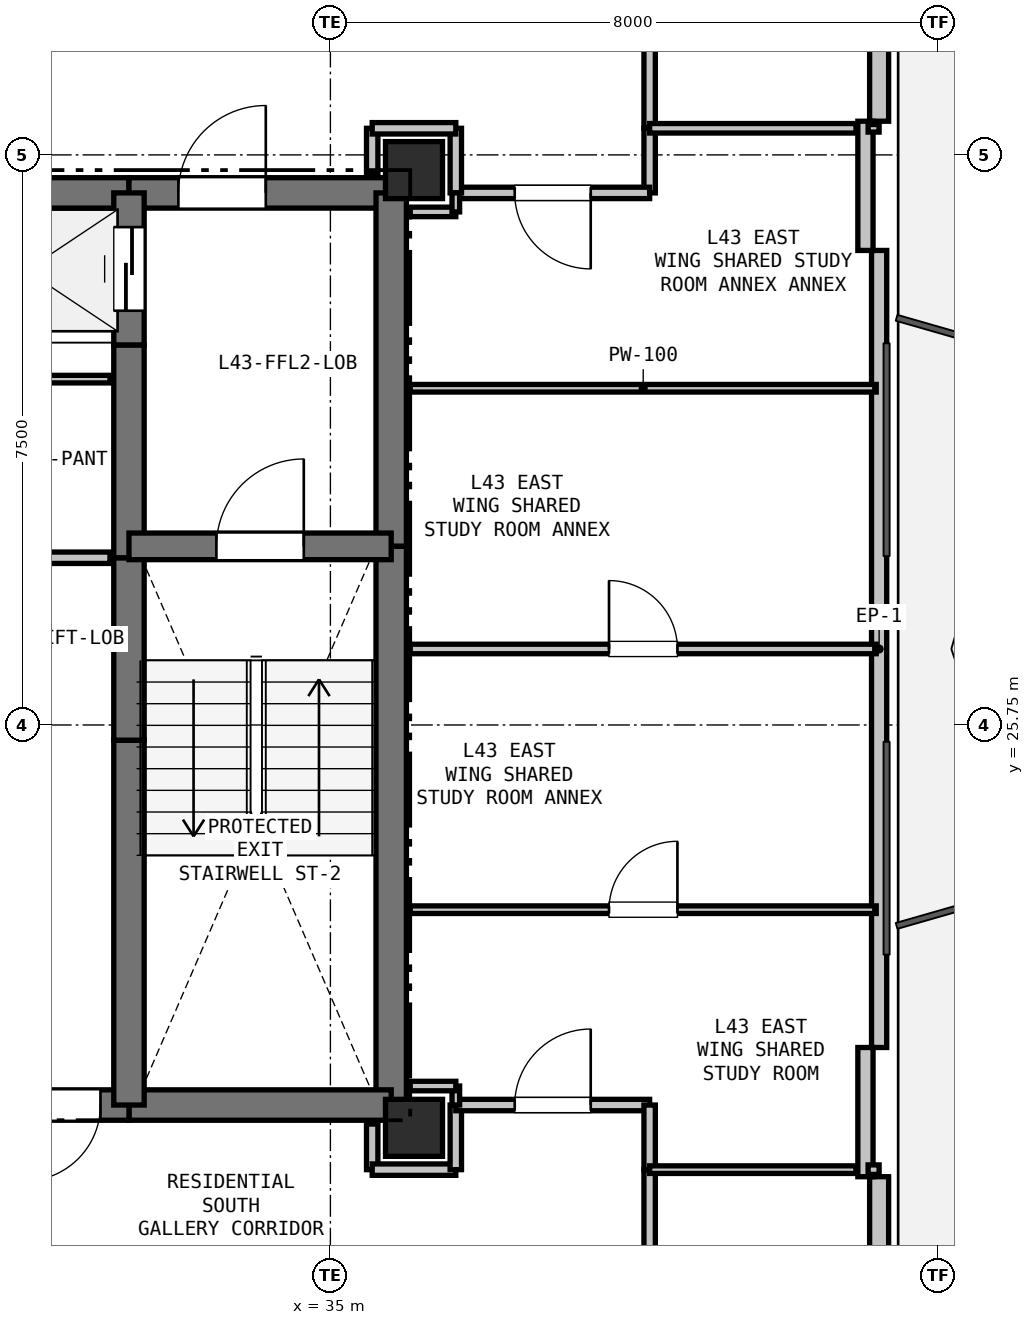
"""IFC4 building model, lengths in metres.
Left out: names, types, materials, properties, quantities, classifications, styles, units other than length and angle.
Written with IfcOpenShell. Run it as: python <this file> out.ifc"""

import sys

from ifc_helpers import new_model, si_unit, direction, frame, frame_2d, origin, origin_2d, place, context, subcontext, project, spatial, rectangle, extrude, element, fill, save


model = new_model("IFC4")
c1 = context("Model", 3, precision=1e-05, world=origin(), true_north=direction((0.0, 1.0)))
c2 = subcontext(c1, "Body", "Model", "MODEL_VIEW")
j1 = project(units=[si_unit("LENGTHUNIT", "METRE"), si_unit("PLANEANGLEUNIT", "RADIAN")], contexts=[c1])
p1 = place(None, origin())
s1 = spatial("IfcSite", under=j1, at=p1, CompositionType="ELEMENT")
p2 = place(p1, origin())
s2 = spatial("IfcBuilding", under=s1, at=p2, CompositionType="ELEMENT")
p3 = place(p2, frame((0.0, 0.0, 154.2)))
s3 = spatial("IfcBuildingStorey", under=s2, at=p3, CompositionType="ELEMENT", Elevation=154.2)
for number, where, z_axis, x_axis in (
    (1, (36.1, 33.05, 0.0), (0.0, 0.0, 1.0), (1.0, 0.0, 0.0)),
    (2, (36.1, 20.45, 0.0), (0.0, 0.0, 1.0), (1.0, 0.0, 0.0)),
):
    element("IfcColumn", number, at=place(p3, frame(where, z_axis=z_axis, x_axis=x_axis)), inside=s3, PredefinedType="COLUMN", context=c2, shape_type="SweptSolid", body=[
        extrude(rectangle(XDim=0.75, YDim=0.75, at=origin_2d()), origin(), (0.0, 0.0, 1.0), 3.3),
    ])
p4 = place(p3, frame((42.219, 44.879, 0.0), z_axis=(0.0, 0.0, 1.0), x_axis=(0.0, -1.0, 0.0)))
e3 = element("IfcWall", 3, at=p4, inside=s3, PredefinedType="SOLIDWALL", context=c2, shape_type="SweptSolid", body=[
    extrude(rectangle(XDim=11.186, YDim=0.25, at=frame_2d((5.593, 0.0))), origin(), (0.0, 0.0, 1.0), 2.68),
])
p5 = place(p4, frame((7.095, 0.0, 0.0)))
e4 = element("IfcOpeningElement", 4, at=p5, cuts=e3, PredefinedType="OPENING", context=c2, shape_type="SweptSolid", body=[
    extrude(rectangle(XDim=1.0, YDim=2.1, at=frame_2d((0.5, 1.05))), frame((0.0, 0.135, 0.0), z_axis=(0.0, -1.0, 0.0), x_axis=(1.0, 0.0, 0.0)), (0.0, 0.0, 1.0), 0.27),
])
p6 = place(p3, frame((42.219, 31.993, 0.0), z_axis=(0.0, 0.0, 1.0), x_axis=(0.0, -1.0, 0.0)))
e5 = element("IfcWall", 5, at=p6, inside=s3, PredefinedType="PARAPET", context=c2, shape_type="SweptSolid", body=[
    extrude(rectangle(XDim=10.486, YDim=0.2, at=frame_2d((5.243, 0.0))), origin(), (0.0, 0.0, 1.0), 0.2),
])
p7 = place(p3, frame((42.219, 19.807, 0.0), z_axis=(0.0, 0.0, 1.0), x_axis=(0.0, -1.0, 0.0)))
e6 = element("IfcWall", 6, at=p7, inside=s3, PredefinedType="SOLIDWALL", context=c2, shape_type="SweptSolid", body=[
    extrude(rectangle(XDim=11.186, YDim=0.25, at=frame_2d((5.593, 0.0))), origin(), (0.0, 0.0, 1.0), 2.68),
])
p8 = place(p7, frame((2.796, 0.0, 0.9)))
e7 = element("IfcOpeningElement", 7, at=p8, cuts=e6, PredefinedType="OPENING", context=c2, shape_type="SweptSolid", body=[
    extrude(rectangle(XDim=1.2, YDim=1.5, at=frame_2d((0.6, 0.75))), frame((0.0, 0.135, 0.0), z_axis=(0.0, -1.0, 0.0), x_axis=(1.0, 0.0, 0.0)), (0.0, 0.0, 1.0), 0.27),
])
for number, where, z_axis, x_axis in (
    (8, (42.039, 33.693, 0.0), (0.0, 0.0, 1.0), (0.0, -1.0, 0.0)),
    (9, (42.039, 21.507, 0.0), (0.0, 0.0, 1.0), (0.0, -1.0, 0.0)),
):
    element("IfcWall", number, at=place(p3, frame(where, z_axis=z_axis, x_axis=x_axis)), inside=s3, PredefinedType="PARAPET", context=c2, shape_type="SweptSolid", body=[
        extrude(rectangle(XDim=1.7, YDim=0.2, at=frame_2d((0.85, 0.0))), origin(), (0.0, 0.0, 1.0), 2.68),
    ])
p9 = place(p3, frame((29.65, 32.75, 0.0), z_axis=(0.0, 0.0, 1.0), x_axis=(1.0, 0.0, 0.0)))
e10 = element("IfcWall", 10, at=p9, inside=s3, PredefinedType="SHEAR", context=c2, shape_type="SweptSolid", body=[
    extrude(rectangle(XDim=2.7, YDim=0.4, at=frame_2d((1.35, 0.0))), origin(), (0.0, 0.0, 1.0), 3.06),
])
p10 = place(p3, frame((32.35, 32.75, 0.0), z_axis=(0.0, 0.0, 1.0), x_axis=(1.0, 0.0, 0.0)))
e11 = element("IfcWall", 11, at=p10, inside=s3, PredefinedType="SHEAR", context=c2, shape_type="SweptSolid", body=[
    extrude(rectangle(XDim=3.45, YDim=0.4, at=frame_2d((1.725, 0.0))), origin(), (0.0, 0.0, 1.0), 3.06),
])
p11 = place(p10, frame((0.65, 0.0, 0.0)))
e12 = element("IfcOpeningElement", 12, at=p11, cuts=e11, PredefinedType="OPENING", context=c2, shape_type="SweptSolid", body=[
    extrude(rectangle(XDim=1.15, YDim=2.15, at=frame_2d((0.575, 1.075))), frame((0.0, 0.21, 0.0), z_axis=(0.0, -1.0, 0.0), x_axis=(1.0, 0.0, 0.0)), (0.0, 0.0, 1.0), 0.42),
])
p12 = place(p3, frame((35.8, 32.75, 0.0), z_axis=(0.0, 0.0, 1.0), x_axis=(0.0, -1.0, 0.0)))
e13 = element("IfcWall", 13, at=p12, inside=s3, PredefinedType="SHEAR", context=c2, shape_type="SweptSolid", body=[
    extrude(rectangle(XDim=4.65, YDim=0.4, at=frame_2d((2.325, 0.0))), origin(), (0.0, 0.0, 1.0), 3.06),
])
p13 = place(p3, frame((35.8, 28.1, 0.0), z_axis=(0.0, 0.0, 1.0), x_axis=(0.0, -1.0, 0.0)))
e14 = element("IfcWall", 14, at=p13, inside=s3, PredefinedType="SHEAR", context=c2, shape_type="SweptSolid", body=[
    extrude(rectangle(XDim=7.35, YDim=0.4, at=frame_2d((3.675, 0.0))), origin(), (0.0, 0.0, 1.0), 3.06),
])
p14 = place(p3, frame((35.8, 20.75, 0.0), z_axis=(0.0, 0.0, 1.0), x_axis=(-1.0, 0.0, 0.0)))
e15 = element("IfcWall", 15, at=p14, inside=s3, PredefinedType="SHEAR", context=c2, shape_type="SweptSolid", body=[
    extrude(rectangle(XDim=3.45, YDim=0.4, at=frame_2d((1.725, 0.0))), origin(), (0.0, 0.0, 1.0), 3.06),
])
p15 = place(p3, frame((32.35, 20.75, 0.0), z_axis=(0.0, 0.0, 1.0), x_axis=(-1.0, 0.0, 0.0)))
e16 = element("IfcWall", 16, at=p15, inside=s3, PredefinedType="SHEAR", context=c2, shape_type="SweptSolid", body=[
    extrude(rectangle(XDim=1.75, YDim=0.4, at=frame_2d((0.875, 0.0))), origin(), (0.0, 0.0, 1.0), 3.06),
])
p16 = place(p15, frame((0.375, 0.0, 0.0)))
e17 = element("IfcOpeningElement", 17, at=p16, cuts=e16, PredefinedType="OPENING", context=c2, shape_type="SweptSolid", body=[
    extrude(rectangle(XDim=1.0, YDim=2.15, at=frame_2d((0.5, 1.075))), frame((0.0, 0.21, 0.0), z_axis=(0.0, -1.0, 0.0), x_axis=(1.0, 0.0, 0.0)), (0.0, 0.0, 1.0), 0.42),
])
p17 = place(p3, frame((32.35, 20.75, 0.0), z_axis=(0.0, 0.0, 1.0), x_axis=(0.0, 1.0, 0.0)))
e18 = element("IfcWall", 18, at=p17, inside=s3, PredefinedType="SHEAR", context=c2, shape_type="SweptSolid", body=[
    extrude(rectangle(XDim=4.8, YDim=0.4, at=frame_2d((2.4, 0.0))), origin(), (0.0, 0.0, 1.0), 3.06),
])
p18 = place(p3, frame((32.35, 25.55, 0.0), z_axis=(0.0, 0.0, 1.0), x_axis=(0.0, 1.0, 0.0)))
e19 = element("IfcWall", 19, at=p18, inside=s3, PredefinedType="SHEAR", context=c2, shape_type="SweptSolid", body=[
    extrude(rectangle(XDim=2.4, YDim=0.4, at=frame_2d((1.2, 0.0))), origin(), (0.0, 0.0, 1.0), 3.06),
])
p19 = place(p3, frame((32.35, 27.95, 0.0), z_axis=(0.0, 0.0, 1.0), x_axis=(0.0, 1.0, 0.0)))
e20 = element("IfcWall", 20, at=p19, inside=s3, PredefinedType="SHEAR", context=c2, shape_type="SweptSolid", body=[
    extrude(rectangle(XDim=2.8, YDim=0.4, at=frame_2d((1.4, 0.0))), origin(), (0.0, 0.0, 1.0), 3.06),
])
p20 = place(p3, frame((32.35, 30.75, 0.0), z_axis=(0.0, 0.0, 1.0), x_axis=(0.0, 1.0, 0.0)))
e21 = element("IfcWall", 21, at=p20, inside=s3, PredefinedType="SHEAR", context=c2, shape_type="SweptSolid", body=[
    extrude(rectangle(XDim=2.0, YDim=0.4, at=frame_2d((1.0, 0.0))), origin(), (0.0, 0.0, 1.0), 3.06),
])
p21 = place(p20, frame((0.45, 0.0, 0.0)))
e22 = element("IfcOpeningElement", 22, at=p21, cuts=e21, PredefinedType="OPENING", context=c2, shape_type="SweptSolid", body=[
    extrude(rectangle(XDim=1.1, YDim=2.15, at=frame_2d((0.55, 1.075))), frame((0.0, 0.21, 0.0), z_axis=(0.0, -1.0, 0.0), x_axis=(1.0, 0.0, 0.0)), (0.0, 0.0, 1.0), 0.42),
])
p22 = place(p3, frame((32.35, 28.1, 0.0), z_axis=(0.0, 0.0, 1.0), x_axis=(1.0, 0.0, 0.0)))
e23 = element("IfcWall", 23, at=p22, inside=s3, PredefinedType="SHEAR", context=c2, shape_type="SweptSolid", body=[
    extrude(rectangle(XDim=3.45, YDim=0.35, at=frame_2d((1.725, 0.0))), origin(), (0.0, 0.0, 1.0), 3.06),
])
p23 = place(p22, frame((1.15, 0.0, 0.0)))
e24 = element("IfcOpeningElement", 24, at=p23, cuts=e23, PredefinedType="OPENING", context=c2, shape_type="SweptSolid", body=[
    extrude(rectangle(XDim=1.15, YDim=2.15, at=frame_2d((0.575, 1.075))), frame((0.0, 0.185, 0.0), z_axis=(0.0, -1.0, 0.0), x_axis=(1.0, 0.0, 0.0)), (0.0, 0.0, 1.0), 0.37),
])
p24 = place(p3, frame((32.1, 30.3, 0.0), z_axis=(0.0, 0.0, 1.0), x_axis=(-1.0, 0.0, 0.0)))
e25 = element("IfcWall", 25, at=p24, inside=s3, PredefinedType="PARTITIONING", context=c2, shape_type="SweptSolid", body=[
    extrude(rectangle(XDim=2.45, YDim=0.1, at=frame_2d((1.225, 0.0))), origin(), (0.0, 0.0, 1.0), 3.06),
])
p25 = place(p3, frame((27.4, 27.95, 0.0), z_axis=(0.0, 0.0, 1.0), x_axis=(1.0, 0.0, 0.0)))
e26 = element("IfcWall", 26, at=p25, inside=s3, PredefinedType="PARTITIONING", context=c2, shape_type="SweptSolid", body=[
    extrude(rectangle(XDim=4.7, YDim=0.15, at=frame_2d((2.35, 0.0))), origin(), (0.0, 0.0, 1.0), 3.06),
])
p26 = place(p25, frame((1.85, 0.0, 0.0)))
e27 = element("IfcOpeningElement", 27, at=p26, cuts=e26, PredefinedType="OPENING", context=c2, shape_type="SweptSolid", body=[
    extrude(rectangle(XDim=1.0, YDim=2.15, at=frame_2d((0.5, 1.075))), frame((0.0, 0.085, 0.0), z_axis=(0.0, -1.0, 0.0), x_axis=(1.0, 0.0, 0.0)), (0.0, 0.0, 1.0), 0.17),
])
p27 = place(p3, frame((35.55, 33.6, 0.0), z_axis=(0.0, 0.0, 1.0), x_axis=(0.0, -1.0, 0.0)))
e28 = element("IfcWall", 28, at=p27, inside=s3, PredefinedType="PARTITIONING", context=c2, shape_type="SweptSolid", body=[
    extrude(rectangle(XDim=0.6, YDim=0.15, at=frame_2d((0.3, 0.0))), origin(), (0.0, 0.0, 1.0), 2.585),
])
p28 = place(p3, frame((39.2, 35.35, 0.0), z_axis=(0.0, 0.0, 1.0), x_axis=(0.0, -1.0, 0.0)))
e29 = element("IfcWall", 29, at=p28, inside=s3, PredefinedType="PARTITIONING", context=c2, shape_type="SweptSolid", body=[
    extrude(rectangle(XDim=1.75, YDim=0.15, at=frame_2d((0.875, 0.0))), origin(), (0.0, 0.0, 1.0), 3.06),
])
p29 = place(p3, frame((39.2, 33.6, 0.0), z_axis=(0.0, 0.0, 1.0), x_axis=(0.0, -1.0, 0.0)))
e30 = element("IfcWall", 30, at=p29, inside=s3, PredefinedType="PARTITIONING", context=c2, shape_type="SweptSolid", body=[
    extrude(rectangle(XDim=0.85, YDim=0.15, at=frame_2d((0.425, 0.0))), origin(), (0.0, 0.0, 1.0), 3.06),
])
p30 = place(p3, frame((39.2, 32.75, 0.0), z_axis=(0.0, 0.0, 1.0), x_axis=(-1.0, 0.0, 0.0)))
e31 = element("IfcWall", 31, at=p30, inside=s3, PredefinedType="PARTITIONING", context=c2, shape_type="SweptSolid", body=[
    extrude(rectangle(XDim=2.55, YDim=0.15, at=frame_2d((1.275, 0.0))), origin(), (0.0, 0.0, 1.0), 3.06),
])
p31 = place(p30, frame((0.775, 0.0, 0.0)))
e32 = element("IfcOpeningElement", 32, at=p31, cuts=e31, PredefinedType="OPENING", context=c2, shape_type="SweptSolid", body=[
    extrude(rectangle(XDim=1.0, YDim=2.15, at=frame_2d((0.5, 1.075))), frame((0.0, 0.085, 0.0), z_axis=(0.0, -1.0, 0.0), x_axis=(1.0, 0.0, 0.0)), (0.0, 0.0, 1.0), 0.17),
])
p32 = place(p3, frame((36.65, 32.75, 0.0), z_axis=(0.0, 0.0, 1.0), x_axis=(0.0, 1.0, 0.0)))
e33 = element("IfcWall", 33, at=p32, inside=s3, PredefinedType="PARTITIONING", context=c2, shape_type="SweptSolid", body=[
    extrude(rectangle(XDim=0.85, YDim=0.15, at=frame_2d((0.425, 0.0))), origin(), (0.0, 0.0, 1.0), 2.433),
])
p33 = place(p3, frame((36.65, 33.6, 0.0), z_axis=(0.0, 0.0, 1.0), x_axis=(-1.0, 0.0, 0.0)))
e34 = element("IfcWall", 34, at=p33, inside=s3, PredefinedType="PARTITIONING", context=c2, shape_type="SweptSolid", body=[
    extrude(rectangle(XDim=1.1, YDim=0.15, at=frame_2d((0.55, 0.0))), origin(), (0.0, 0.0, 1.0), 2.433),
])
p34 = place(p3, frame((35.55, 20.5, 0.0), z_axis=(0.0, 0.0, 1.0), x_axis=(0.0, -1.0, 0.0)))
e35 = element("IfcWall", 35, at=p34, inside=s3, PredefinedType="PARTITIONING", context=c2, shape_type="SweptSolid", body=[
    extrude(rectangle(XDim=0.6, YDim=0.15, at=frame_2d((0.3, 0.0))), origin(), (0.0, 0.0, 1.0), 2.585),
])
p35 = place(p3, frame((35.55, 19.9, 0.0), z_axis=(0.0, 0.0, 1.0), x_axis=(1.0, 0.0, 0.0)))
e36 = element("IfcWall", 36, at=p35, inside=s3, PredefinedType="PARTITIONING", context=c2, shape_type="SweptSolid", body=[
    extrude(rectangle(XDim=1.1, YDim=0.15, at=frame_2d((0.55, 0.0))), origin(), (0.0, 0.0, 1.0), 2.433),
])
p36 = place(p3, frame((36.65, 19.9, 0.0), z_axis=(0.0, 0.0, 1.0), x_axis=(0.0, 1.0, 0.0)))
e37 = element("IfcWall", 37, at=p36, inside=s3, PredefinedType="PARTITIONING", context=c2, shape_type="SweptSolid", body=[
    extrude(rectangle(XDim=0.85, YDim=0.15, at=frame_2d((0.425, 0.0))), origin(), (0.0, 0.0, 1.0), 3.06),
])
p37 = place(p3, frame((36.65, 20.75, 0.0), z_axis=(0.0, 0.0, 1.0), x_axis=(1.0, 0.0, 0.0)))
e38 = element("IfcWall", 38, at=p37, inside=s3, PredefinedType="PARTITIONING", context=c2, shape_type="SweptSolid", body=[
    extrude(rectangle(XDim=2.55, YDim=0.15, at=frame_2d((1.275, 0.0))), origin(), (0.0, 0.0, 1.0), 3.06),
])
p38 = place(p37, frame((0.775, 0.0, 0.0)))
e39 = element("IfcOpeningElement", 39, at=p38, cuts=e38, PredefinedType="OPENING", context=c2, shape_type="SweptSolid", body=[
    extrude(rectangle(XDim=1.0, YDim=2.15, at=frame_2d((0.5, 1.075))), frame((0.0, 0.085, 0.0), z_axis=(0.0, -1.0, 0.0), x_axis=(1.0, 0.0, 0.0)), (0.0, 0.0, 1.0), 0.17),
])
p39 = place(p3, frame((39.2, 20.75, 0.0), z_axis=(0.0, 0.0, 1.0), x_axis=(0.0, -1.0, 0.0)))
e40 = element("IfcWall", 40, at=p39, inside=s3, PredefinedType="PARTITIONING", context=c2, shape_type="SweptSolid", body=[
    extrude(rectangle(XDim=0.85, YDim=0.15, at=frame_2d((0.425, 0.0))), origin(), (0.0, 0.0, 1.0), 3.06),
])
p40 = place(p3, frame((39.2, 19.9, 0.0), z_axis=(0.0, 0.0, 1.0), x_axis=(0.0, -1.0, 0.0)))
e41 = element("IfcWall", 41, at=p40, inside=s3, PredefinedType="PARTITIONING", context=c2, shape_type="SweptSolid", body=[
    extrude(rectangle(XDim=1.75, YDim=0.15, at=frame_2d((0.875, 0.0))), origin(), (0.0, 0.0, 1.0), 3.06),
])
p41 = place(p3, frame((36.65, 20.75, 0.0), z_axis=(0.0, 0.0, 1.0), x_axis=(0.0, 1.0, 0.0)))
e42 = element("IfcWall", 42, at=p41, inside=s3, PredefinedType="PARTITIONING", context=c2, shape_type="SweptSolid", body=[
    extrude(rectangle(XDim=0.25, YDim=0.1, at=frame_2d((0.125, 0.0))), origin(), (0.0, 0.0, 1.0), 3.06),
])
p42 = place(p3, frame((36.65, 21.0, 0.0), z_axis=(0.0, 0.0, 1.0), x_axis=(-1.0, 0.0, 0.0)))
e43 = element("IfcWall", 43, at=p42, inside=s3, PredefinedType="PARTITIONING", context=c2, shape_type="SweptSolid", body=[
    extrude(rectangle(XDim=0.6, YDim=0.125, at=frame_2d((0.3, 0.0))), origin(), (0.0, 0.0, 1.0), 2.585),
])
p43 = place(p3, frame((36.05, 23.32, 0.0), z_axis=(0.0, 0.0, 1.0), x_axis=(1.0, 0.0, 0.0)))
e44 = element("IfcWall", 44, at=p43, inside=s3, PredefinedType="PARTITIONING", context=c2, shape_type="SweptSolid", body=[
    extrude(rectangle(XDim=6.131, YDim=0.1, at=frame_2d((3.065, 0.0))), origin(), (0.0, 0.0, 1.0), 2.365),
])
p44 = place(p43, frame((2.615, 0.0, 0.0)))
e45 = element("IfcOpeningElement", 45, at=p44, cuts=e44, PredefinedType="OPENING", context=c2, shape_type="SweptSolid", body=[
    extrude(rectangle(XDim=0.9, YDim=2.1, at=frame_2d((0.45, 1.05))), frame((0.0, 0.06, 0.0), z_axis=(0.0, -1.0, 0.0), x_axis=(1.0, 0.0, 0.0)), (0.0, 0.0, 1.0), 0.12),
])
p45 = place(p3, frame((42.219, 19.9, 0.0), z_axis=(0.0, 0.0, 1.0), x_axis=(-1.0, 0.0, 0.0)))
e46 = element("IfcWall", 46, at=p45, inside=s3, PredefinedType="PARTITIONING", context=c2, shape_type="SweptSolid", body=[
    extrude(rectangle(XDim=0.145, YDim=0.125, at=frame_2d((0.072, 0.0))), origin(), (0.0, 0.0, 1.0), 3.06),
])
p46 = place(p3, frame((41.915, 19.9, 0.0), z_axis=(0.0, 0.0, 1.0), x_axis=(-1.0, 0.0, 0.0)))
e47 = element("IfcWall", 47, at=p46, inside=s3, PredefinedType="PARTITIONING", context=c2, shape_type="SweptSolid", body=[
    extrude(rectangle(XDim=2.715, YDim=0.1, at=frame_2d((1.358, 0.0))), origin(), (0.0, 0.0, 1.0), 2.365),
])
p47 = place(p3, frame((36.05, 26.75, 0.0), z_axis=(0.0, 0.0, 1.0), x_axis=(1.0, 0.0, 0.0)))
e48 = element("IfcWall", 48, at=p47, inside=s3, PredefinedType="PARTITIONING", context=c2, shape_type="SweptSolid", body=[
    extrude(rectangle(XDim=6.131, YDim=0.125, at=frame_2d((3.065, 0.0))), origin(), (0.0, 0.0, 1.0), 2.365),
])
p48 = place(p47, frame((2.615, 0.0, 0.0)))
e49 = element("IfcOpeningElement", 49, at=p48, cuts=e48, PredefinedType="OPENING", context=c2, shape_type="SweptSolid", body=[
    extrude(rectangle(XDim=0.9, YDim=2.1, at=frame_2d((0.45, 1.05))), frame((0.0, 0.073, 0.0), z_axis=(0.0, -1.0, 0.0), x_axis=(1.0, 0.0, 0.0)), (0.0, 0.0, 1.0), 0.145),
])
p49 = place(p3, frame((36.05, 30.18, 0.0), z_axis=(0.0, 0.0, 1.0), x_axis=(1.0, 0.0, 0.0)))
e50 = element("IfcWall", 50, at=p49, inside=s3, PredefinedType="PARTITIONING", context=c2, shape_type="SweptSolid", body=[
    extrude(rectangle(XDim=6.131, YDim=0.1, at=frame_2d((3.065, 0.0))), origin(), (0.0, 0.0, 1.0), 2.365),
])
p50 = place(p3, frame((39.2, 33.6, 0.0), z_axis=(0.0, 0.0, 1.0), x_axis=(1.0, 0.0, 0.0)))
e51 = element("IfcWall", 51, at=p50, inside=s3, PredefinedType="PARTITIONING", context=c2, shape_type="SweptSolid", body=[
    extrude(rectangle(XDim=2.715, YDim=0.125, at=frame_2d((1.358, 0.0))), origin(), (0.0, 0.0, 1.0), 2.365),
])
p51 = place(p3, frame((42.074, 33.6, 0.0), z_axis=(0.0, 0.0, 1.0), x_axis=(1.0, 0.0, 0.0)))
e52 = element("IfcWall", 52, at=p51, inside=s3, PredefinedType="PARTITIONING", context=c2, shape_type="SweptSolid", body=[
    extrude(rectangle(XDim=0.145, YDim=0.1, at=frame_2d((0.072, 0.0))), origin(), (0.0, 0.0, 1.0), 3.06),
])
p52 = place(p3, frame((36.05, 32.5, 0.0), z_axis=(0.0, 0.0, 1.0), x_axis=(1.0, 0.0, 0.0)))
e53 = element("IfcWall", 53, at=p52, inside=s3, PredefinedType="PARTITIONING", context=c2, shape_type="SweptSolid", body=[
    extrude(rectangle(XDim=0.6, YDim=0.125, at=frame_2d((0.3, 0.0))), origin(), (0.0, 0.0, 1.0), 2.585),
])
p53 = place(p3, frame((36.65, 32.5, 0.0), z_axis=(0.0, 0.0, 1.0), x_axis=(0.0, 1.0, 0.0)))
e54 = element("IfcWall", 54, at=p53, inside=s3, PredefinedType="PARTITIONING", context=c2, shape_type="SweptSolid", body=[
    extrude(rectangle(XDim=0.25, YDim=0.1, at=frame_2d((0.125, 0.0))), origin(), (0.0, 0.0, 1.0), 3.06),
])
p54 = place(p16, origin())
e55 = element("IfcDoor", 55, at=p54, inside=s3, OperationType="SINGLE_SWING_RIGHT", PredefinedType="DOOR", context=c2, shape_type="SweptSolid", body=[
    extrude(rectangle(XDim=1.0, YDim=2.15, at=frame_2d((0.5, 1.075))), frame((0.0, 0.025, 0.0), z_axis=(0.0, -1.0, 0.0), x_axis=(1.0, 0.0, 0.0)), (0.0, 0.0, 1.0), 0.05),
])
fill(e17, e55)
p55 = place(p21, origin())
e56 = element("IfcDoor", 56, at=p55, inside=s3, OperationType="SLIDING_TO_LEFT", PredefinedType="DOOR", context=c2, shape_type="SweptSolid", body=[
    extrude(rectangle(XDim=1.1, YDim=2.15, at=frame_2d((0.55, 1.075))), frame((0.0, 0.025, 0.0), z_axis=(0.0, -1.0, 0.0), x_axis=(1.0, 0.0, 0.0)), (0.0, 0.0, 1.0), 0.05),
])
fill(e22, e56)
p56 = place(p23, origin())
e57 = element("IfcDoor", 57, at=p56, inside=s3, OperationType="SINGLE_SWING_RIGHT", PredefinedType="DOOR", context=c2, shape_type="SweptSolid", body=[
    extrude(rectangle(XDim=1.15, YDim=2.15, at=frame_2d((0.575, 1.075))), frame((0.0, 0.025, 0.0), z_axis=(0.0, -1.0, 0.0), x_axis=(1.0, 0.0, 0.0)), (0.0, 0.0, 1.0), 0.05),
])
fill(e24, e57)
p57 = place(p11, origin())
e58 = element("IfcDoor", 58, at=p57, inside=s3, OperationType="SINGLE_SWING_RIGHT", PredefinedType="DOOR", context=c2, shape_type="SweptSolid", body=[
    extrude(rectangle(XDim=1.15, YDim=2.15, at=frame_2d((0.575, 1.075))), frame((0.0, 0.025, 0.0), z_axis=(0.0, -1.0, 0.0), x_axis=(1.0, 0.0, 0.0)), (0.0, 0.0, 1.0), 0.05),
])
fill(e12, e58)
p58 = place(p31, origin())
e59 = element("IfcDoor", 59, at=p58, inside=s3, OperationType="SINGLE_SWING_LEFT", PredefinedType="DOOR", context=c2, shape_type="SweptSolid", body=[
    extrude(rectangle(XDim=1.0, YDim=2.15, at=frame_2d((0.5, 1.075))), frame((0.0, 0.025, 0.0), z_axis=(0.0, -1.0, 0.0), x_axis=(1.0, 0.0, 0.0)), (0.0, 0.0, 1.0), 0.05),
])
fill(e32, e59)
p59 = place(p38, origin())
e60 = element("IfcDoor", 60, at=p59, inside=s3, OperationType="SINGLE_SWING_RIGHT", PredefinedType="DOOR", context=c2, shape_type="SweptSolid", body=[
    extrude(rectangle(XDim=1.0, YDim=2.15, at=frame_2d((0.5, 1.075))), frame((0.0, 0.025, 0.0), z_axis=(0.0, -1.0, 0.0), x_axis=(1.0, 0.0, 0.0)), (0.0, 0.0, 1.0), 0.05),
])
fill(e39, e60)
p60 = place(p44, origin())
e61 = element("IfcDoor", 61, at=p60, inside=s3, OperationType="SINGLE_SWING_RIGHT", PredefinedType="DOOR", context=c2, shape_type="SweptSolid", body=[
    extrude(rectangle(XDim=0.9, YDim=2.1, at=frame_2d((0.45, 1.05))), frame((0.0, 0.025, 0.0), z_axis=(0.0, -1.0, 0.0), x_axis=(1.0, 0.0, 0.0)), (0.0, 0.0, 1.0), 0.05),
])
fill(e45, e61)
p61 = place(p48, origin())
e62 = element("IfcDoor", 62, at=p61, inside=s3, OperationType="SINGLE_SWING_LEFT", PredefinedType="DOOR", context=c2, shape_type="SweptSolid", body=[
    extrude(rectangle(XDim=0.9, YDim=2.1, at=frame_2d((0.45, 1.05))), frame((0.0, 0.025, 0.0), z_axis=(0.0, -1.0, 0.0), x_axis=(1.0, 0.0, 0.0)), (0.0, 0.0, 1.0), 0.05),
])
fill(e49, e62)
save(model, sys.argv[1])
